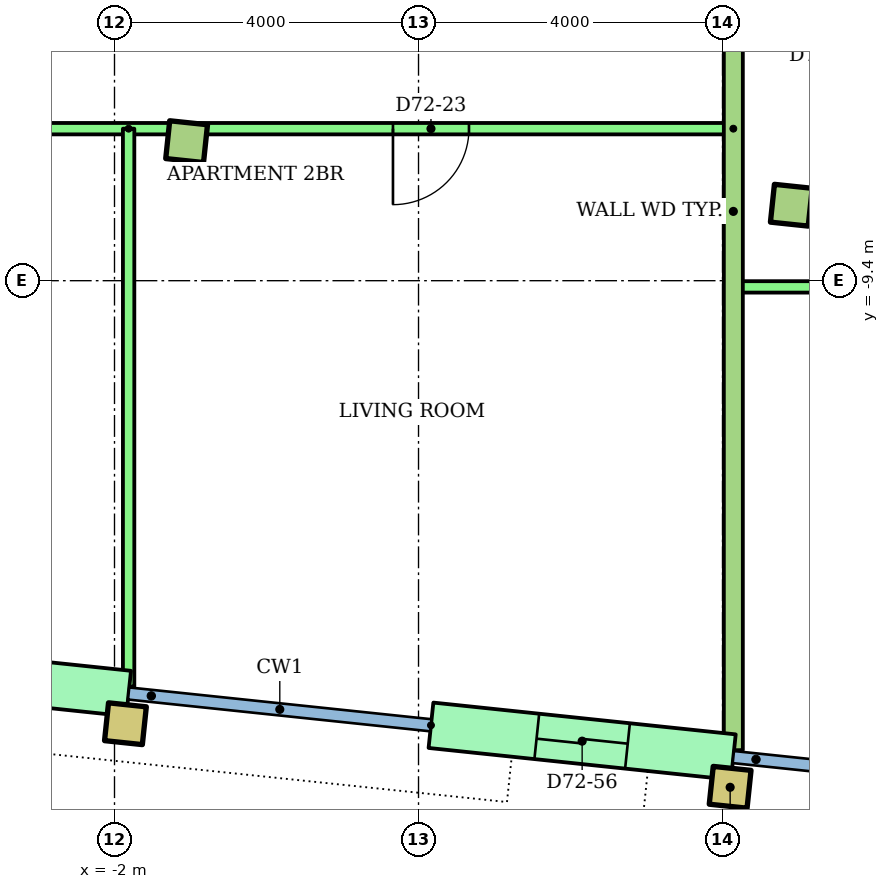
"""IFC4 building model, lengths in metres.
Left out: names, types, materials, properties, quantities, classifications, styles, units other than length and angle.
Written with IfcOpenShell. Run it as: python <this file> out.ifc"""

import sys

from ifc_helpers import new_model, si_unit, direction, frame, frame_2d, origin, origin_2d, place, context, subcontext, project, spatial, rectangle, hollow_rectangle, extrude, element, fill, save


model = new_model("IFC4")
c1 = context("Model", 3, precision=1e-05, world=origin(), true_north=direction((0.0, 1.0)))
c2 = subcontext(c1, "Body", "Model", "MODEL_VIEW")
j1 = project(units=[si_unit("LENGTHUNIT", "METRE"), si_unit("PLANEANGLEUNIT", "RADIAN")], contexts=[c1])
p1 = place(None, origin())
s1 = spatial("IfcSite", under=j1, at=p1, CompositionType="ELEMENT")
p2 = place(p1, origin())
s2 = spatial("IfcBuilding", under=s1, at=p2, CompositionType="ELEMENT")
p3 = place(p2, frame((0.0, 0.0, 275.5)))
s3 = spatial("IfcBuildingStorey", under=s2, at=p3, CompositionType="ELEMENT", Elevation=275.5)
for number, where, z_axis, x_axis in (
    (1, (-1.856, -15.229, 0.0), (0.0, 0.0, 1.0), (0.995, -0.105, 0.0)),
    (2, (6.1, -16.065, 0.0), (0.0, 0.0, 1.0), (0.995, -0.105, 0.0)),
):
    element("IfcColumn", number, at=place(p3, frame(where, z_axis=z_axis, x_axis=x_axis)), inside=s3, PredefinedType="COLUMN", context=c2, shape_type="SweptSolid", body=[
        extrude(hollow_rectangle(XDim=0.5, YDim=0.5, WallThickness=0.025, at=origin_2d()), origin(), (0.0, 0.0, 1.0), 3.2),
    ])
for number, where, z_axis, x_axis in (
    (3, (-1.051, -7.571, 0.0), (0.0, 0.0, 1.0), (0.995, -0.105, 0.0)),
    (4, (6.905, -8.407, 0.0), (0.0, 0.0, 1.0), (0.995, -0.105, 0.0)),
):
    element("IfcColumn", number, at=place(p3, frame(where, z_axis=z_axis, x_axis=x_axis)), inside=s3, PredefinedType="COLUMN", context=c2, shape_type="SweptSolid", body=[
        extrude(rectangle(XDim=0.5, YDim=0.5, at=origin_2d()), origin(), (0.0, 0.0, 1.0), 3.2),
    ])
p4 = place(p3, frame((-5.792, -14.413, 0.0), z_axis=(0.0, 0.0, 1.0), x_axis=(0.99452550138, -0.104494148666, 0.0)))
e5 = element("IfcWall", 5, at=p4, inside=s3, PredefinedType="STANDARD", context=c2, shape_type="SweptSolid", body=[
    extrude(rectangle(XDim=4.0, YDim=0.6, at=frame_2d((2.0, 0.0))), origin(), (0.0, 0.0, 1.0), 2.92),
])
p5 = place(p4, frame((1.4, 0.0, 0.0)))
e6 = element("IfcOpeningElement", 6, at=p5, cuts=e5, PredefinedType="OPENING", context=c2, shape_type="SweptSolid", body=[
    extrude(rectangle(XDim=1.2, YDim=2.1, at=frame_2d((0.6, 1.05))), frame((0.0, 0.31, 0.0), z_axis=(0.0, -1.0, 0.0), x_axis=(1.0, 0.0, 0.0)), (0.0, 0.0, 1.0), 0.62),
])
p6 = place(p3, frame((2.164, -15.249, 0.0), z_axis=(0.0, 0.0, 1.0), x_axis=(0.99452550138, -0.104494148666, 0.0)))
e7 = element("IfcWall", 7, at=p6, inside=s3, PredefinedType="STANDARD", context=c2, shape_type="SweptSolid", body=[
    extrude(rectangle(XDim=4.0, YDim=0.6, at=frame_2d((2.0, 0.0))), origin(), (0.0, 0.0, 1.0), 2.92),
])
p7 = place(p6, frame((1.4, 0.0, 0.0)))
e8 = element("IfcOpeningElement", 8, at=p7, cuts=e7, PredefinedType="OPENING", context=c2, shape_type="SweptSolid", body=[
    extrude(rectangle(XDim=1.2, YDim=2.1, at=frame_2d((0.6, 1.05))), frame((0.0, 0.31, 0.0), z_axis=(0.0, -1.0, 0.0), x_axis=(1.0, 0.0, 0.0)), (0.0, 0.0, 1.0), 0.62),
])
p8 = place(p3, frame((6.142, -7.4, 0.0), z_axis=(0.0, 0.0, 1.0), x_axis=(-1.0, 0.0, 0.0)))
e9 = element("IfcWall", 9, at=p8, inside=s3, PredefinedType="PARTITIONING", context=c2, shape_type="SweptSolid", body=[
    extrude(rectangle(XDim=15.912, YDim=0.15, at=frame_2d((7.956, 0.0))), origin(), (0.0, 0.0, 1.0), 2.4),
])
p9 = place(p8, frame((12.252, 0.0, 0.0)))
e10 = element("IfcOpeningElement", 10, at=p9, cuts=e9, PredefinedType="OPENING", context=c2, shape_type="SweptSolid", body=[
    extrude(rectangle(XDim=0.9, YDim=2.1, at=frame_2d((0.45, 1.05))), frame((0.0, 0.085, 0.0), z_axis=(0.0, -1.0, 0.0), x_axis=(1.0, 0.0, 0.0)), (0.0, 0.0, 1.0), 0.17),
])
p10 = place(p8, frame((9.495, 0.0, 0.0)))
e11 = element("IfcOpeningElement", 11, at=p10, cuts=e9, PredefinedType="OPENING", context=c2, shape_type="SweptSolid", body=[
    extrude(rectangle(XDim=0.9, YDim=2.1, at=frame_2d((0.45, 1.05))), frame((0.0, 0.085, 0.0), z_axis=(0.0, -1.0, 0.0), x_axis=(1.0, 0.0, 0.0)), (0.0, 0.0, 1.0), 0.17),
])
p11 = place(p8, frame((3.478, 0.0, 0.0)))
e12 = element("IfcOpeningElement", 12, at=p11, cuts=e9, PredefinedType="OPENING", context=c2, shape_type="SweptSolid", body=[
    extrude(rectangle(XDim=1.0, YDim=2.1, at=frame_2d((0.5, 1.05))), frame((0.0, 0.085, 0.0), z_axis=(0.0, -1.0, 0.0), x_axis=(1.0, 0.0, 0.0)), (0.0, 0.0, 1.0), 0.17),
])
p12 = place(p3, frame((-1.814, -7.4, 0.0), z_axis=(0.0, 0.0, 1.0), x_axis=(0.0, -1.0, 0.0)))
e13 = element("IfcWall", 13, at=p12, inside=s3, PredefinedType="PARTITIONING", context=c2, shape_type="SweptSolid", body=[
    extrude(rectangle(XDim=7.341, YDim=0.15, at=frame_2d((3.67, 0.0))), origin(), (0.0, 0.0, 1.0), 2.4),
])
p13 = place(p3, frame((29.94, -9.482, 0.0), z_axis=(0.0, 0.0, 1.0), x_axis=(-1.0, 0.0, 0.0)))
e14 = element("IfcWall", 14, at=p13, inside=s3, PredefinedType="PARTITIONING", context=c2, shape_type="SweptSolid", body=[
    extrude(rectangle(XDim=23.798, YDim=0.15, at=frame_2d((11.899, 0.0))), origin(), (0.0, 0.0, 1.0), 2.4),
])
p14 = place(p13, frame((19.32, 0.0, 0.0)))
e15 = element("IfcOpeningElement", 15, at=p14, cuts=e14, PredefinedType="OPENING", context=c2, shape_type="SweptSolid", body=[
    extrude(rectangle(XDim=1.0, YDim=2.1, at=frame_2d((0.5, 1.05))), frame((0.0, 0.085, 0.0), z_axis=(0.0, -1.0, 0.0), x_axis=(1.0, 0.0, 0.0)), (0.0, 0.0, 1.0), 0.17),
])
p15 = place(p13, frame((13.403, 0.0, 0.0)))
e16 = element("IfcOpeningElement", 16, at=p15, cuts=e14, PredefinedType="OPENING", context=c2, shape_type="SweptSolid", body=[
    extrude(rectangle(XDim=0.9, YDim=2.1, at=frame_2d((0.45, 1.05))), frame((0.0, 0.085, 0.0), z_axis=(0.0, -1.0, 0.0), x_axis=(1.0, 0.0, 0.0)), (0.0, 0.0, 1.0), 0.17),
])
p16 = place(p13, frame((9.425, 0.0, 0.0)))
e17 = element("IfcOpeningElement", 17, at=p16, cuts=e14, PredefinedType="OPENING", context=c2, shape_type="SweptSolid", body=[
    extrude(rectangle(XDim=0.9, YDim=2.1, at=frame_2d((0.45, 1.05))), frame((0.0, 0.085, 0.0), z_axis=(0.0, -1.0, 0.0), x_axis=(1.0, 0.0, 0.0)), (0.0, 0.0, 1.0), 0.17),
])
p17 = place(p13, frame((2.434, 0.0, 0.0)))
e18 = element("IfcOpeningElement", 18, at=p17, cuts=e14, PredefinedType="OPENING", context=c2, shape_type="SweptSolid", body=[
    extrude(rectangle(XDim=0.9, YDim=2.1, at=frame_2d((0.45, 1.05))), frame((0.0, 0.085, 0.0), z_axis=(0.0, -1.0, 0.0), x_axis=(1.0, 0.0, 0.0)), (0.0, 0.0, 1.0), 0.17),
])
p18 = place(p3, frame((6.142, -1.4, 0.0), z_axis=(0.0, 0.0, 1.0), x_axis=(0.0, -1.0, 0.0)))
e19 = element("IfcWall", 19, at=p18, inside=s3, PredefinedType="PARTITIONING", context=c2, shape_type="SweptSolid", body=[
    extrude(rectangle(XDim=14.177, YDim=0.25, at=frame_2d((7.088, 0.0))), origin(), (0.0, 0.0, 1.0), 2.4),
])
p19 = place(p11, origin())
e20 = element("IfcDoor", 20, at=p19, inside=s3, OperationType="SINGLE_SWING_RIGHT", PredefinedType="DOOR", context=c2, shape_type="SweptSolid", body=[
    extrude(rectangle(XDim=1.0, YDim=2.1, at=frame_2d((0.5, 1.05))), frame((0.0, 0.025, 0.0), z_axis=(0.0, -1.0, 0.0), x_axis=(1.0, 0.0, 0.0)), (0.0, 0.0, 1.0), 0.05),
])
fill(e12, e20)
p20 = place(p7, origin())
e21 = element("IfcDoor", 21, at=p20, inside=s3, OperationType="SLIDING_TO_LEFT", PredefinedType="DOOR", context=c2, shape_type="SweptSolid", body=[
    extrude(rectangle(XDim=1.2, YDim=2.1, at=frame_2d((0.6, 1.05))), frame((0.0, 0.025, 0.0), z_axis=(0.0, -1.0, 0.0), x_axis=(1.0, 0.0, 0.0)), (0.0, 0.0, 1.0), 0.05),
])
fill(e8, e21)
save(model, sys.argv[1])
